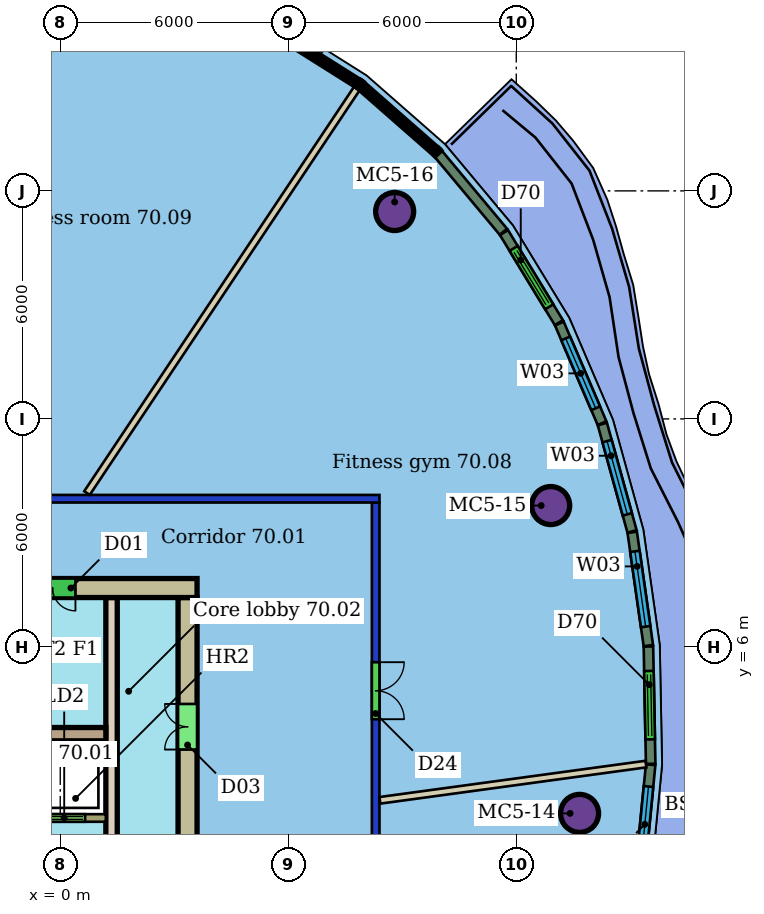
"""IFC4 building model, lengths in metres.
Left out: names, types, materials, properties, quantities, classifications, styles, units other than length and angle.
Written with IfcOpenShell. Run it as: python <this file> out.ifc"""

import sys

from ifc_helpers import new_model, si_unit, direction, frame, frame_2d, origin, origin_2d, place, context, subcontext, project, spatial, rectangle, hollow_circle, extrude, element, fill, save


model = new_model("IFC4")
c1 = context("Model", 3, precision=1e-05, world=origin(), true_north=direction((0.0, 1.0)))
c2 = subcontext(c1, "Body", "Model", "MODEL_VIEW")
j1 = project(units=[si_unit("LENGTHUNIT", "METRE"), si_unit("PLANEANGLEUNIT", "RADIAN")], contexts=[c1])
p1 = place(None, origin())
s1 = spatial("IfcSite", under=j1, at=p1, CompositionType="ELEMENT")
p2 = place(p1, origin())
s2 = spatial("IfcBuilding", under=s1, at=p2, CompositionType="ELEMENT")
p3 = place(p2, frame((0.0, 0.0, 282.9)))
s3 = spatial("IfcBuildingStorey", under=s2, at=p3, CompositionType="ELEMENT", Elevation=282.9)
for number, where, z_axis, x_axis in (
    (1, (13.666, 1.62, 0.0), (0.0, 0.0, 1.0), (1.0, 0.0, 0.0)),
    (2, (12.906, 9.72, 0.0), (0.0, 0.0, 1.0), (1.0, 0.0, 0.0)),
    (3, (8.8, 17.457, 0.0), (0.0, 0.0, 1.0), (1.0, 0.0, 0.0)),
):
    element("IfcColumn", number, at=place(p3, frame(where, z_axis=z_axis, x_axis=x_axis)), inside=s3, PredefinedType="COLUMN", context=c2, shape_type="SweptSolid", body=[
        extrude(hollow_circle(Radius=0.5, WallThickness=0.04, at=origin_2d()), origin(), (0.0, 0.0, 1.0), 3.45),
    ])
p4 = place(p3, frame((-20.4, 9.9, 0.0), z_axis=(0.0, 0.0, 1.0), x_axis=(1.0, 0.0, 0.0)))
e4 = element("IfcWall", 4, at=p4, inside=s3, PredefinedType="PARTITIONING", context=c2, shape_type="SweptSolid", body=[
    extrude(rectangle(XDim=28.8, YDim=0.2, at=frame_2d((14.4, 0.0))), origin(), (0.0, 0.0, 1.0), 3.1),
])
p5 = place(p4, frame((12.36, 0.0, 0.0)))
e5 = element("IfcOpeningElement", 5, at=p5, cuts=e4, PredefinedType="OPENING", context=c2, shape_type="SweptSolid", body=[
    extrude(rectangle(XDim=0.9, YDim=2.1, at=frame_2d((0.45, 1.05))), frame((0.0, 0.11, 0.0), z_axis=(0.0, -1.0, 0.0), x_axis=(1.0, 0.0, 0.0)), (0.0, 0.0, 1.0), 0.22),
])
p6 = place(p4, frame((6.2, 0.0, 0.0)))
e6 = element("IfcOpeningElement", 6, at=p6, cuts=e4, PredefinedType="OPENING", context=c2, shape_type="SweptSolid", body=[
    extrude(rectangle(XDim=1.8, YDim=2.1, at=frame_2d((0.9, 1.05))), frame((0.0, 0.11, 0.0), z_axis=(0.0, -1.0, 0.0), x_axis=(1.0, 0.0, 0.0)), (0.0, 0.0, 1.0), 0.22),
])
p7 = place(p4, frame((18.669, 0.0, 0.0)))
e7 = element("IfcOpeningElement", 7, at=p7, cuts=e4, PredefinedType="OPENING", context=c2, shape_type="SweptSolid", body=[
    extrude(rectangle(XDim=1.0, YDim=2.1, at=frame_2d((0.5, 1.05))), frame((0.0, 0.11, 0.0), z_axis=(0.0, -1.0, 0.0), x_axis=(1.0, 0.0, 0.0)), (0.0, 0.0, 1.0), 0.22),
])
p8 = place(p3, frame((8.3, 9.8, 0.0), z_axis=(0.0, 0.0, 1.0), x_axis=(0.0, -1.0, 0.0)))
e8 = element("IfcWall", 8, at=p8, inside=s3, PredefinedType="PARTITIONING", context=c2, shape_type="SweptSolid", body=[
    extrude(rectangle(XDim=19.6, YDim=0.2, at=frame_2d((9.8, 0.0))), origin(), (0.0, 0.0, 1.0), 3.1),
])
p9 = place(p8, frame((14.189, 0.0, 0.0)))
e9 = element("IfcOpeningElement", 9, at=p9, cuts=e8, PredefinedType="OPENING", context=c2, shape_type="SweptSolid", body=[
    extrude(rectangle(XDim=1.5, YDim=2.1, at=frame_2d((0.75, 1.05))), frame((0.0, 0.11, 0.0), z_axis=(0.0, -1.0, 0.0), x_axis=(1.0, 0.0, 0.0)), (0.0, 0.0, 1.0), 0.22),
])
p10 = place(p8, frame((9.651, 0.0, 0.0)))
e10 = element("IfcOpeningElement", 10, at=p10, cuts=e8, PredefinedType="OPENING", context=c2, shape_type="SweptSolid", body=[
    extrude(rectangle(XDim=1.5, YDim=2.4, at=frame_2d((0.75, 1.2))), frame((0.0, 0.11, 0.0), z_axis=(0.0, -1.0, 0.0), x_axis=(1.0, 0.0, 0.0)), (0.0, 0.0, 1.0), 0.22),
])
p11 = place(p8, frame((4.201, 0.0, 0.0)))
e11 = element("IfcOpeningElement", 11, at=p11, cuts=e8, PredefinedType="OPENING", context=c2, shape_type="SweptSolid", body=[
    extrude(rectangle(XDim=1.5, YDim=2.1, at=frame_2d((0.75, 1.05))), frame((0.0, 0.11, 0.0), z_axis=(0.0, -1.0, 0.0), x_axis=(1.0, 0.0, 0.0)), (0.0, 0.0, 1.0), 0.22),
])
p12 = place(p3, frame((15.412, 2.918, 0.0), z_axis=(0.0, 0.0, 1.0), x_axis=(-0.99084383144, -0.135012968627, 0.0)))
e12 = element("IfcWall", 12, at=p12, inside=s3, PredefinedType="PARTITIONING", context=c2, shape_type="SweptSolid", body=[
    extrude(rectangle(XDim=7.065, YDim=0.175, at=frame_2d((3.532, 0.0))), origin(), (0.0, 0.0, 1.0), 3.45),
])
p13 = place(p3, frame((7.807, 20.697, 0.0), z_axis=(0.0, 0.0, 1.0), x_axis=(-0.55495104707, -0.83188300581, 0.0)))
e13 = element("IfcWall", 13, at=p13, inside=s3, PredefinedType="PARTITIONING", context=c2, shape_type="SweptSolid", body=[
    extrude(rectangle(XDim=12.801, YDim=0.175, at=frame_2d((6.4, 0.0))), origin(), (0.0, 0.0, 1.0), 3.45),
])
p14 = place(p3, frame((15.228, -0.238, 0.0), z_axis=(0.0, 0.0, 1.0), x_axis=(0.097526326892, 0.995232945377, 0.0)))
e14 = element("IfcWall", 14, at=p14, inside=s3, PredefinedType="SOLIDWALL", context=c2, shape_type="SweptSolid", body=[
    extrude(rectangle(XDim=3.154, YDim=0.25, at=frame_2d((1.577, 0.0))), origin(), (0.0, 0.0, 1.0), 3.15),
])
p15 = place(p14, frame((0.577, 0.0, 0.9)))
e15 = element("IfcOpeningElement", 15, at=p15, cuts=e14, PredefinedType="OPENING", context=c2, shape_type="SweptSolid", body=[
    extrude(rectangle(XDim=2.0, YDim=2.1, at=frame_2d((1.0, 1.05))), frame((0.0, 0.135, 0.0), z_axis=(0.0, -1.0, 0.0), x_axis=(1.0, 0.0, 0.0)), (0.0, 0.0, 1.0), 0.27),
])
p16 = place(p3, frame((15.537, 2.924, 0.0), z_axis=(0.0, 0.0, 1.0), x_axis=(-0.019213534435, 0.999815403009, 0.0)))
e16 = element("IfcWall", 16, at=p16, inside=s3, PredefinedType="SOLIDWALL", context=c2, shape_type="SweptSolid", body=[
    extrude(rectangle(XDim=3.088, YDim=0.25, at=frame_2d((1.544, 0.0))), origin(), (0.0, 0.0, 1.0), 3.15),
])
p17 = place(p16, frame((0.644, 0.0, 0.0)))
e17 = element("IfcOpeningElement", 17, at=p17, cuts=e16, PredefinedType="OPENING", context=c2, shape_type="SweptSolid", body=[
    extrude(rectangle(XDim=1.8, YDim=2.4, at=frame_2d((0.9, 1.2))), frame((0.0, 0.135, 0.0), z_axis=(0.0, -1.0, 0.0), x_axis=(1.0, 0.0, 0.0)), (0.0, 0.0, 1.0), 0.27),
])
p18 = place(p3, frame((15.476, 6.034, 0.0), z_axis=(0.0, 0.0, 1.0), x_axis=(-0.140956080181, 0.990015850105, 0.0)))
e18 = element("IfcWall", 18, at=p18, inside=s3, PredefinedType="SOLIDWALL", context=c2, shape_type="SweptSolid", body=[
    extrude(rectangle(XDim=3.012, YDim=0.25, at=frame_2d((1.506, 0.0))), origin(), (0.0, 0.0, 1.0), 3.15),
])
p19 = place(p18, frame((0.506, 0.0, 0.9)))
e19 = element("IfcOpeningElement", 19, at=p19, cuts=e18, PredefinedType="OPENING", context=c2, shape_type="SweptSolid", body=[
    extrude(rectangle(XDim=2.0, YDim=2.1, at=frame_2d((1.0, 1.05))), frame((0.0, 0.135, 0.0), z_axis=(0.0, -1.0, 0.0), x_axis=(1.0, 0.0, 0.0)), (0.0, 0.0, 1.0), 0.27),
])
p20 = place(p3, frame((15.046, 9.04, 0.0), z_axis=(0.0, 0.0, 1.0), x_axis=(-0.266526791612, 0.963827510166, 0.0)))
e20 = element("IfcWall", 20, at=p20, inside=s3, PredefinedType="SOLIDWALL", context=c2, shape_type="SweptSolid", body=[
    extrude(rectangle(XDim=2.931, YDim=0.25, at=frame_2d((1.466, 0.0))), origin(), (0.0, 0.0, 1.0), 3.15),
])
p21 = place(p20, frame((0.466, 0.0, 0.9)))
e21 = element("IfcOpeningElement", 21, at=p21, cuts=e20, PredefinedType="OPENING", context=c2, shape_type="SweptSolid", body=[
    extrude(rectangle(XDim=2.0, YDim=2.1, at=frame_2d((1.0, 1.05))), frame((0.0, 0.135, 0.0), z_axis=(0.0, -1.0, 0.0), x_axis=(1.0, 0.0, 0.0)), (0.0, 0.0, 1.0), 0.27),
])
p22 = place(p3, frame((14.257, 11.888, 0.0), z_axis=(0.0, 0.0, 1.0), x_axis=(-0.394043302687, 0.919091875499, 0.0)))
e22 = element("IfcWall", 22, at=p22, inside=s3, PredefinedType="SOLIDWALL", context=c2, shape_type="SweptSolid", body=[
    extrude(rectangle(XDim=2.851, YDim=0.25, at=frame_2d((1.426, 0.0))), origin(), (0.0, 0.0, 1.0), 3.15),
])
p23 = place(p22, frame((0.426, 0.0, 0.9)))
e23 = element("IfcOpeningElement", 23, at=p23, cuts=e22, PredefinedType="OPENING", context=c2, shape_type="SweptSolid", body=[
    extrude(rectangle(XDim=2.0, YDim=2.1, at=frame_2d((1.0, 1.05))), frame((0.0, 0.135, 0.0), z_axis=(0.0, -1.0, 0.0), x_axis=(1.0, 0.0, 0.0)), (0.0, 0.0, 1.0), 0.27),
])
p24 = place(p3, frame((13.122, 14.532, 0.0), z_axis=(0.0, 0.0, 1.0), x_axis=(-0.520443293114, 0.853896234125, 0.0)))
e24 = element("IfcWall", 24, at=p24, inside=s3, PredefinedType="SOLIDWALL", context=c2, shape_type="SweptSolid", body=[
    extrude(rectangle(XDim=2.777, YDim=0.25, at=frame_2d((1.389, 0.0))), origin(), (0.0, 0.0, 1.0), 3.15),
])
p25 = place(p24, frame((0.489, 0.0, 0.0)))
e25 = element("IfcOpeningElement", 25, at=p25, cuts=e24, PredefinedType="OPENING", context=c2, shape_type="SweptSolid", body=[
    extrude(rectangle(XDim=1.8, YDim=2.4, at=frame_2d((0.9, 1.2))), frame((0.0, 0.135, 0.0), z_axis=(0.0, -1.0, 0.0), x_axis=(1.0, 0.0, 0.0)), (0.0, 0.0, 1.0), 0.27),
])
p26 = place(p3, frame((11.661, 16.925, 0.0), z_axis=(0.0, 0.0, 1.0), x_axis=(-0.641449708793, 0.767165087246, 0.0)))
e26 = element("IfcWall", 26, at=p26, inside=s3, PredefinedType="SOLIDWALL", context=c2, shape_type="SweptSolid", body=[
    extrude(rectangle(XDim=2.674, YDim=0.25, at=frame_2d((1.337, 0.0))), origin(), (0.0, 0.0, 1.0), 3.15),
])
p27 = place(p3, frame((3.6, 7.55, 0.0), z_axis=(0.0, 0.0, 1.0), x_axis=(-1.0, 0.0, 0.0)))
e27 = element("IfcWall", 27, at=p27, inside=s3, PredefinedType="SHEAR", context=c2, shape_type="SweptSolid", body=[
    extrude(rectangle(XDim=9.6, YDim=0.5, at=frame_2d((4.8, 0.0))), origin(), (0.0, 0.0, 1.0), 3.3),
])
p28 = place(p27, frame((3.2, 0.0, 0.0)))
e28 = element("IfcOpeningElement", 28, at=p28, cuts=e27, PredefinedType="OPENING", context=c2, shape_type="SweptSolid", body=[
    extrude(rectangle(XDim=1.2, YDim=2.1, at=frame_2d((0.6, 1.05))), frame((0.0, 0.26, 0.0), z_axis=(0.0, -1.0, 0.0), x_axis=(1.0, 0.0, 0.0)), (0.0, 0.0, 1.0), 0.52),
])
p29 = place(p3, frame((3.35, -7.3, 0.0), z_axis=(0.0, 0.0, 1.0), x_axis=(0.0, 1.0, 0.0)))
e29 = element("IfcWall", 29, at=p29, inside=s3, PredefinedType="SHEAR", context=c2, shape_type="SweptSolid", body=[
    extrude(rectangle(XDim=14.6, YDim=0.5, at=frame_2d((7.3, 0.0))), origin(), (0.0, 0.0, 1.0), 3.3),
])
p30 = place(p29, frame((2.8, 0.0, 0.0)))
e30 = element("IfcOpeningElement", 30, at=p30, cuts=e29, PredefinedType="OPENING", context=c2, shape_type="SweptSolid", body=[
    extrude(rectangle(XDim=1.2, YDim=2.1, at=frame_2d((0.6, 1.05))), frame((0.0, 0.26, 0.0), z_axis=(0.0, -1.0, 0.0), x_axis=(1.0, 0.0, 0.0)), (0.0, 0.0, 1.0), 0.52),
])
p31 = place(p29, frame((10.6, 0.0, 0.0)))
e31 = element("IfcOpeningElement", 31, at=p31, cuts=e29, PredefinedType="OPENING", context=c2, shape_type="SweptSolid", body=[
    extrude(rectangle(XDim=1.2, YDim=2.1, at=frame_2d((0.6, 1.05))), frame((0.0, 0.26, 0.0), z_axis=(0.0, -1.0, 0.0), x_axis=(1.0, 0.0, 0.0)), (0.0, 0.0, 1.0), 0.52),
])
p32 = place(p3, frame((-6.0, 3.705, 0.0), z_axis=(0.0, 0.0, 1.0), x_axis=(1.0, 0.0, 0.0)))
e32 = element("IfcWall", 32, at=p32, inside=s3, PredefinedType="SHEAR", context=c2, shape_type="SweptSolid", body=[
    extrude(rectangle(XDim=7.2, YDim=0.35, at=frame_2d((3.6, 0.0))), origin(), (0.0, 0.0, 1.0), 3.3),
])
p33 = place(p3, frame((1.35, -7.3, 0.0), z_axis=(0.0, 0.0, 1.0), x_axis=(0.0, 1.0, 0.0)))
e33 = element("IfcWall", 33, at=p33, inside=s3, PredefinedType="SHEAR", context=c2, shape_type="SweptSolid", body=[
    extrude(rectangle(XDim=14.6, YDim=0.3, at=frame_2d((7.3, 0.0))), origin(), (0.0, 0.0, 1.0), 3.3),
])
p34 = place(p33, frame((1.21, 0.0, 0.0)))
e34 = element("IfcOpeningElement", 34, at=p34, cuts=e33, PredefinedType="OPENING", context=c2, shape_type="SweptSolid", body=[
    extrude(rectangle(XDim=1.0, YDim=2.1, at=frame_2d((0.5, 1.05))), frame((0.0, 0.16, 0.0), z_axis=(0.0, -1.0, 0.0), x_axis=(1.0, 0.0, 0.0)), (0.0, 0.0, 1.0), 0.32),
])
p35 = place(p33, frame((6.55, 0.0, 0.0)))
e35 = element("IfcOpeningElement", 35, at=p35, cuts=e33, PredefinedType="OPENING", context=c2, shape_type="SweptSolid", body=[
    extrude(rectangle(XDim=1.5, YDim=2.1, at=frame_2d((0.75, 1.05))), frame((0.0, 0.16, 0.0), z_axis=(0.0, -1.0, 0.0), x_axis=(1.0, 0.0, 0.0)), (0.0, 0.0, 1.0), 0.32),
])
p36 = place(p3, frame((-13.2, 1.5, 0.0), z_axis=(0.0, 0.0, 1.0), x_axis=(1.0, 0.0, 0.0)))
e36 = element("IfcWall", 36, at=p36, inside=s3, PredefinedType="SHEAR", context=c2, shape_type="SweptSolid", body=[
    extrude(rectangle(XDim=14.4, YDim=0.2, at=frame_2d((7.2, 0.0))), origin(), (0.0, 0.0, 1.0), 3.3),
])
p37 = place(p36, frame((10.312, 0.0, 0.0)))
e37 = element("IfcOpeningElement", 37, at=p37, cuts=e36, PredefinedType="OPENING", context=c2, shape_type="SweptSolid", body=[
    extrude(rectangle(XDim=1.1, YDim=2.1, at=frame_2d((0.55, 1.05))), frame((0.0, 0.11, 0.0), z_axis=(0.0, -1.0, 0.0), x_axis=(1.0, 0.0, 0.0)), (0.0, 0.0, 1.0), 0.22),
])
p38 = place(p36, frame((12.754, 0.0, 0.0)))
e38 = element("IfcOpeningElement", 38, at=p38, cuts=e36, PredefinedType="OPENING", context=c2, shape_type="SweptSolid", body=[
    extrude(rectangle(XDim=1.1, YDim=2.1, at=frame_2d((0.55, 1.05))), frame((0.0, 0.11, 0.0), z_axis=(0.0, -1.0, 0.0), x_axis=(1.0, 0.0, 0.0)), (0.0, 0.0, 1.0), 0.22),
])
p39 = place(p36, frame((0.15, 0.0, 0.0)))
e39 = element("IfcOpeningElement", 39, at=p39, cuts=e36, PredefinedType="OPENING", context=c2, shape_type="SweptSolid", body=[
    extrude(rectangle(XDim=0.9, YDim=2.1, at=frame_2d((0.45, 1.05))), frame((0.0, 0.11, 0.0), z_axis=(0.0, -1.0, 0.0), x_axis=(1.0, 0.0, 0.0)), (0.0, 0.0, 1.0), 0.22),
])
p40 = place(p36, frame((4.222, 0.0, 0.0)))
e40 = element("IfcOpeningElement", 40, at=p40, cuts=e36, PredefinedType="OPENING", context=c2, shape_type="SweptSolid", body=[
    extrude(rectangle(XDim=0.9, YDim=2.1, at=frame_2d((0.45, 1.05))), frame((0.0, 0.11, 0.0), z_axis=(0.0, -1.0, 0.0), x_axis=(1.0, 0.0, 0.0)), (0.0, 0.0, 1.0), 0.22),
])
p41 = place(p36, frame((8.367, 0.0, 0.0)))
e41 = element("IfcOpeningElement", 41, at=p41, cuts=e36, PredefinedType="OPENING", context=c2, shape_type="SweptSolid", body=[
    extrude(rectangle(XDim=1.0, YDim=2.1, at=frame_2d((0.5, 1.05))), frame((0.0, 0.11, 0.0), z_axis=(0.0, -1.0, 0.0), x_axis=(1.0, 0.0, 0.0)), (0.0, 0.0, 1.0), 0.22),
])
p42 = place(p11, origin())
e42 = element("IfcDoor", 42, at=p42, inside=s3, OperationType="DOUBLE_DOOR_SINGLE_SWING", PredefinedType="DOOR", context=c2, shape_type="SweptSolid", body=[
    extrude(rectangle(XDim=1.5, YDim=2.1, at=frame_2d((0.75, 1.05))), frame((0.0, 0.025, 0.0), z_axis=(0.0, -1.0, 0.0), x_axis=(1.0, 0.0, 0.0)), (0.0, 0.0, 1.0), 0.05),
])
fill(e11, e42)
p43 = place(p15, origin())
e43 = element("IfcWindow", 43, at=p43, inside=s3, PartitioningType="SINGLE_PANEL", PredefinedType="WINDOW", context=c2, shape_type="SweptSolid", body=[
    extrude(rectangle(XDim=2.0, YDim=2.1, at=frame_2d((1.0, 1.05))), frame((0.0, 0.03, 0.0), z_axis=(0.0, -1.0, 0.0), x_axis=(1.0, 0.0, 0.0)), (0.0, 0.0, 1.0), 0.06),
])
fill(e15, e43)
p44 = place(p17, origin())
e44 = element("IfcDoor", 44, at=p44, inside=s3, OperationType="DOUBLE_DOOR_SLIDING", PredefinedType="DOOR", context=c2, shape_type="SweptSolid", body=[
    extrude(rectangle(XDim=1.8, YDim=2.4, at=frame_2d((0.9, 1.2))), frame((0.0, 0.025, 0.0), z_axis=(0.0, -1.0, 0.0), x_axis=(1.0, 0.0, 0.0)), (0.0, 0.0, 1.0), 0.05),
])
fill(e17, e44)
p45 = place(p19, origin())
e45 = element("IfcWindow", 45, at=p45, inside=s3, PartitioningType="SINGLE_PANEL", PredefinedType="WINDOW", context=c2, shape_type="SweptSolid", body=[
    extrude(rectangle(XDim=2.0, YDim=2.1, at=frame_2d((1.0, 1.05))), frame((0.0, 0.03, 0.0), z_axis=(0.0, -1.0, 0.0), x_axis=(1.0, 0.0, 0.0)), (0.0, 0.0, 1.0), 0.06),
])
fill(e19, e45)
p46 = place(p21, origin())
e46 = element("IfcWindow", 46, at=p46, inside=s3, PartitioningType="SINGLE_PANEL", PredefinedType="WINDOW", context=c2, shape_type="SweptSolid", body=[
    extrude(rectangle(XDim=2.0, YDim=2.1, at=frame_2d((1.0, 1.05))), frame((0.0, 0.03, 0.0), z_axis=(0.0, -1.0, 0.0), x_axis=(1.0, 0.0, 0.0)), (0.0, 0.0, 1.0), 0.06),
])
fill(e21, e46)
p47 = place(p23, origin())
e47 = element("IfcWindow", 47, at=p47, inside=s3, PartitioningType="SINGLE_PANEL", PredefinedType="WINDOW", context=c2, shape_type="SweptSolid", body=[
    extrude(rectangle(XDim=2.0, YDim=2.1, at=frame_2d((1.0, 1.05))), frame((0.0, 0.03, 0.0), z_axis=(0.0, -1.0, 0.0), x_axis=(1.0, 0.0, 0.0)), (0.0, 0.0, 1.0), 0.06),
])
fill(e23, e47)
p48 = place(p25, origin())
e48 = element("IfcDoor", 48, at=p48, inside=s3, OperationType="DOUBLE_DOOR_SLIDING", PredefinedType="DOOR", context=c2, shape_type="SweptSolid", body=[
    extrude(rectangle(XDim=1.8, YDim=2.4, at=frame_2d((0.9, 1.2))), frame((0.0, 0.025, 0.0), z_axis=(0.0, -1.0, 0.0), x_axis=(1.0, 0.0, 0.0)), (0.0, 0.0, 1.0), 0.05),
])
fill(e25, e48)
p49 = place(p28, origin())
e49 = element("IfcDoor", 49, at=p49, inside=s3, OperationType="DOUBLE_DOOR_SINGLE_SWING", PredefinedType="NOTDEFINED", context=c2, shape_type="SweptSolid", body=[
    extrude(rectangle(XDim=1.2, YDim=2.1, at=frame_2d((0.6, 1.05))), frame((0.0, 0.025, 0.0), z_axis=(0.0, -1.0, 0.0), x_axis=(1.0, 0.0, 0.0)), (0.0, 0.0, 1.0), 0.05),
])
fill(e28, e49)
p50 = place(p31, origin())
e50 = element("IfcDoor", 50, at=p50, inside=s3, OperationType="DOUBLE_DOOR_SINGLE_SWING", PredefinedType="NOTDEFINED", context=c2, shape_type="SweptSolid", body=[
    extrude(rectangle(XDim=1.2, YDim=2.1, at=frame_2d((0.6, 1.05))), frame((0.0, 0.025, 0.0), z_axis=(0.0, -1.0, 0.0), x_axis=(1.0, 0.0, 0.0)), (0.0, 0.0, 1.0), 0.05),
])
fill(e31, e50)
p51 = place(p38, origin())
e51 = element("IfcDoor", 51, at=p51, inside=s3, OperationType="DOUBLE_DOOR_SLIDING", PredefinedType="NOTDEFINED", context=c2, shape_type="SweptSolid", body=[
    extrude(rectangle(XDim=1.1, YDim=2.1, at=frame_2d((0.55, 1.05))), frame((0.0, 0.025, 0.0), z_axis=(0.0, -1.0, 0.0), x_axis=(1.0, 0.0, 0.0)), (0.0, 0.0, 1.0), 0.05),
])
fill(e38, e51)
save(model, sys.argv[1])
